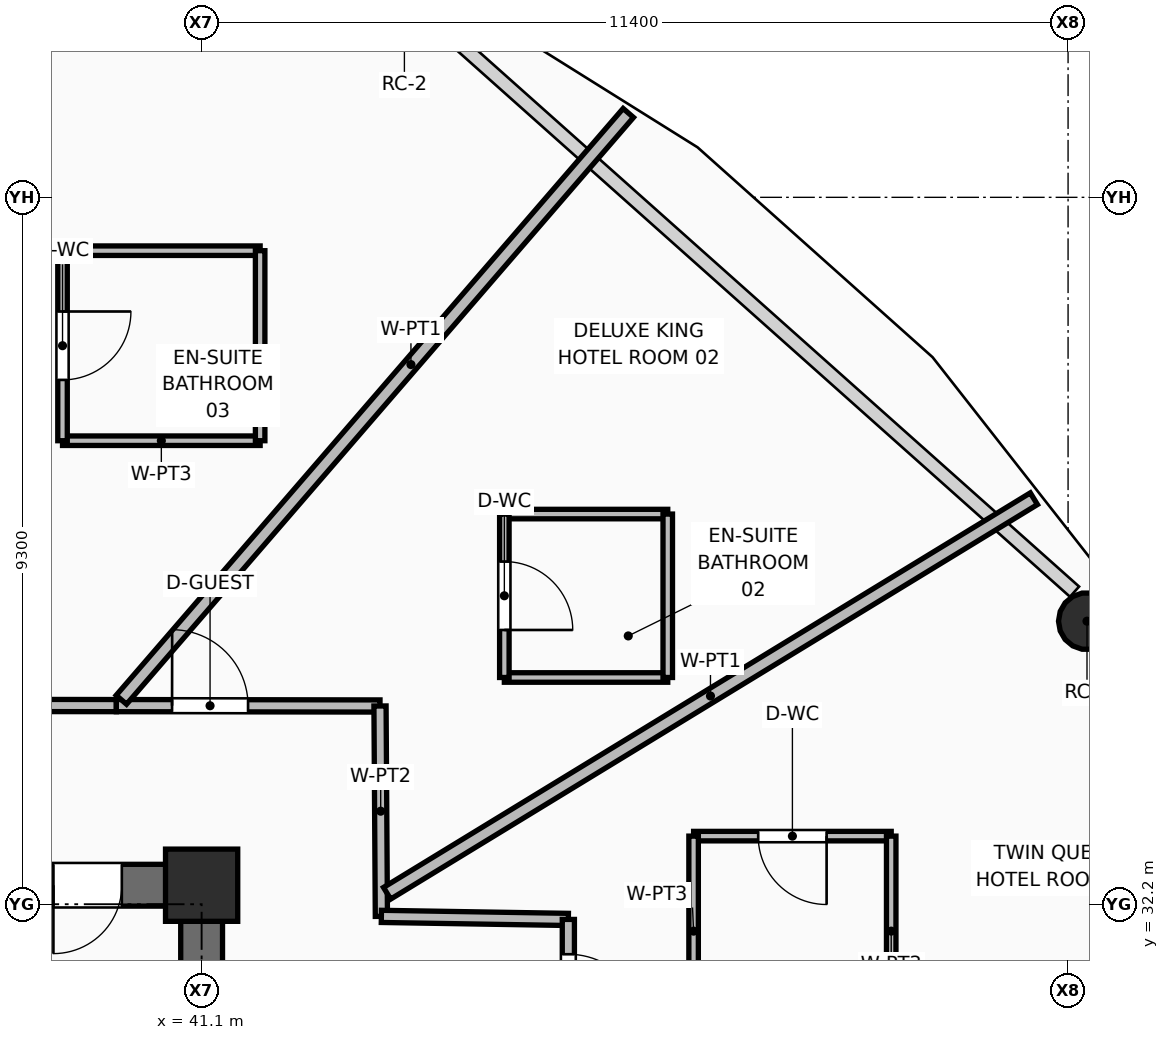
"""IFC4 building model, lengths in metres.
Left out: names, types, materials, properties, quantities, classifications, styles, units other than length and angle.
Written with IfcOpenShell. Run it as: python <this file> out.ifc"""

import sys

from ifc_helpers import new_model, si_unit, direction, frame, frame_2d, origin, origin_2d, place, context, subcontext, project, spatial, rectangle, hollow_circle, extrude, element, fill, save


model = new_model("IFC4")
c1 = context("Model", 3, precision=1e-05, world=origin(), true_north=direction((0.0, 1.0)))
c2 = subcontext(c1, "Body", "Model", "MODEL_VIEW")
j1 = project(units=[si_unit("LENGTHUNIT", "METRE"), si_unit("PLANEANGLEUNIT", "RADIAN")], contexts=[c1])
p1 = place(None, origin())
s1 = spatial("IfcSite", under=j1, at=p1, CompositionType="ELEMENT")
p2 = place(p1, origin())
s2 = spatial("IfcBuilding", under=s1, at=p2, CompositionType="ELEMENT")
p3 = place(p2, frame((0.0, 0.0, 164.7)))
s3 = spatial("IfcBuildingStorey", under=s2, at=p3, CompositionType="ELEMENT", Elevation=164.7)
p4 = place(p3, frame((41.1, 32.45, 0.0), z_axis=(0.0, 0.0, 1.0), x_axis=(1.0, 0.0, 0.0)))
e1 = element("IfcColumn", 1, at=p4, inside=s3, PredefinedType="COLUMN", context=c2, shape_type="SweptSolid", body=[
    extrude(rectangle(XDim=0.95, YDim=0.95, at=origin_2d()), origin(), (0.0, 0.0, 1.0), 3.75),
])
p5 = place(p3, frame((52.749, 35.924, 0.0), z_axis=(0.0, 0.0, 1.0), x_axis=(1.0, 0.0, 0.0)))
e2 = element("IfcColumn", 2, at=p5, inside=s3, PredefinedType="COLUMN", context=c2, shape_type="SweptSolid", body=[
    extrude(hollow_circle(Radius=0.375, WallThickness=0.035, at=origin_2d()), origin(), (0.0, 0.0, 1.0), 3.57),
])
p6 = place(p3, frame((21.625, 32.45, 0.0), z_axis=(0.0, 0.0, 1.0), x_axis=(1.0, 0.0, 0.0)))
e3 = element("IfcWall", 3, at=p6, inside=s3, PredefinedType="SHEAR", context=c2, shape_type="SweptSolid", body=[
    extrude(rectangle(XDim=19.75, YDim=0.55, at=frame_2d((9.875, 0.0))), origin(), (0.0, 0.0, 1.0), 3.57),
])
p7 = place(p6, frame((2.125, 0.0, 0.0)))
e4 = element("IfcOpeningElement", 4, at=p7, cuts=e3, PredefinedType="OPENING", context=c2, shape_type="SweptSolid", body=[
    extrude(rectangle(XDim=1.1, YDim=2.1, at=frame_2d((0.55, 1.05))), frame((0.0, 0.285, 0.0), z_axis=(0.0, -1.0, 0.0), x_axis=(1.0, 0.0, 0.0)), (0.0, 0.0, 1.0), 0.57),
])
p8 = place(p6, frame((15.515, 0.0, 0.0)))
e5 = element("IfcOpeningElement", 5, at=p8, cuts=e3, PredefinedType="OPENING", context=c2, shape_type="SweptSolid", body=[
    extrude(rectangle(XDim=1.0, YDim=2.1, at=frame_2d((0.5, 1.05))), frame((0.0, 0.285, 0.0), z_axis=(0.0, -1.0, 0.0), x_axis=(1.0, 0.0, 0.0)), (0.0, 0.0, 1.0), 0.57),
])
p9 = place(p6, frame((17.525, 0.0, 0.0)))
e6 = element("IfcOpeningElement", 6, at=p9, cuts=e3, PredefinedType="OPENING", context=c2, shape_type="SweptSolid", body=[
    extrude(rectangle(XDim=0.9, YDim=2.1, at=frame_2d((0.45, 1.05))), frame((0.0, 0.285, 0.0), z_axis=(0.0, -1.0, 0.0), x_axis=(1.0, 0.0, 0.0)), (0.0, 0.0, 1.0), 0.57),
])
p10 = place(p3, frame((41.1, 18.075, 0.0), z_axis=(0.0, 0.0, 1.0), x_axis=(0.0, 1.0, 0.0)))
e7 = element("IfcWall", 7, at=p10, inside=s3, PredefinedType="SHEAR", context=c2, shape_type="SweptSolid", body=[
    extrude(rectangle(XDim=14.1, YDim=0.55, at=frame_2d((7.05, 0.0))), origin(), (0.0, 0.0, 1.0), 3.57),
])
p11 = place(p10, frame((3.385, 0.0, 0.0)))
e8 = element("IfcOpeningElement", 8, at=p11, cuts=e7, PredefinedType="OPENING", context=c2, shape_type="SweptSolid", body=[
    extrude(rectangle(XDim=1.05, YDim=2.1, at=frame_2d((0.525, 1.05))), frame((0.0, 0.285, 0.0), z_axis=(0.0, -1.0, 0.0), x_axis=(1.0, 0.0, 0.0)), (0.0, 0.0, 1.0), 0.57),
])
p12 = place(p3, frame((38.54, 34.815, 0.0), z_axis=(0.0, 0.0, 1.0), x_axis=(0.999999077601, -0.001358233043, 0.0)))
e9 = element("IfcWall", 9, at=p12, inside=s3, PredefinedType="PARTITIONING", context=c2, shape_type="SweptSolid", body=[
    extrude(rectangle(XDim=1.438, YDim=0.16, at=frame_2d((0.719, 0.0))), origin(), (0.0, 0.0, 1.0), 3.55),
])
p13 = place(p3, frame((39.978, 34.813, 0.0), z_axis=(0.0, 0.0, 1.0), x_axis=(0.999999009391, -0.001407557195, 0.0)))
e10 = element("IfcWall", 10, at=p13, inside=s3, PredefinedType="PARTITIONING", context=c2, shape_type="SweptSolid", body=[
    extrude(rectangle(XDim=3.469, YDim=0.16, at=frame_2d((1.734, 0.0))), origin(), (0.0, 0.0, 1.0), 3.006),
])
p14 = place(p13, frame((0.733, 0.0, 0.0)))
e11 = element("IfcOpeningElement", 11, at=p14, cuts=e10, PredefinedType="OPENING", context=c2, shape_type="SweptSolid", body=[
    extrude(rectangle(XDim=1.0, YDim=2.1, at=frame_2d((0.5, 1.05))), frame((0.0, 0.09, 0.0), z_axis=(0.0, -1.0, 0.0), x_axis=(1.0, 0.0, 0.0)), (0.0, 0.0, 1.0), 0.18),
])
p15 = place(p3, frame((43.447, 34.808, 0.0), z_axis=(0.0, 0.0, 1.0), x_axis=(0.006526585281, -0.999978701615, 0.0)))
e12 = element("IfcWall", 12, at=p15, inside=s3, PredefinedType="PARTITIONING", context=c2, shape_type="SweptSolid", body=[
    extrude(rectangle(XDim=2.768, YDim=0.16, at=frame_2d((1.384, 0.0))), origin(), (0.0, 0.0, 1.0), 3.006),
])
p16 = place(p3, frame((43.465, 32.04, 0.0), z_axis=(0.0, 0.0, 1.0), x_axis=(0.999867567339, -0.016274144605, 0.0)))
e13 = element("IfcWall", 13, at=p16, inside=s3, PredefinedType="PARTITIONING", context=c2, shape_type="SweptSolid", body=[
    extrude(rectangle(XDim=2.46, YDim=0.16, at=frame_2d((1.23, 0.0))), origin(), (0.0, 0.0, 1.0), 3.55),
])
p17 = place(p3, frame((45.925, 32.0, 0.0), z_axis=(0.0, 0.0, 1.0), x_axis=(0.0, -1.0, 0.0)))
e14 = element("IfcWall", 14, at=p17, inside=s3, PredefinedType="PARTITIONING", context=c2, shape_type="SweptSolid", body=[
    extrude(rectangle(XDim=3.259, YDim=0.16, at=frame_2d((1.629, 0.0))), origin(), (0.0, 0.0, 1.0), 3.55),
])
p18 = place(p17, frame((0.458, 0.0, 0.0)))
e15 = element("IfcOpeningElement", 15, at=p18, cuts=e14, PredefinedType="OPENING", context=c2, shape_type="SweptSolid", body=[
    extrude(rectangle(XDim=1.0, YDim=2.1, at=frame_2d((0.5, 1.05))), frame((0.0, 0.09, 0.0), z_axis=(0.0, -1.0, 0.0), x_axis=(1.0, 0.0, 0.0)), (0.0, 0.0, 1.0), 0.18),
])
p19 = place(p3, frame((43.54, 32.344, 0.0), z_axis=(0.0, 0.0, 1.0), x_axis=(0.853711993856, 0.520745457537, 0.0)))
e16 = element("IfcWall", 16, at=p19, inside=s3, PredefinedType="PARTITIONING", context=c2, shape_type="SweptSolid", body=[
    extrude(rectangle(XDim=9.968, YDim=0.18, at=frame_2d((4.984, 0.0))), origin(), (0.0, 0.0, 1.0), 2.852),
])
p20 = place(p3, frame((40.044, 34.89, 0.0), z_axis=(0.0, 0.0, 1.0), x_axis=(0.653771871809, 0.756691707125, 0.0)))
e17 = element("IfcWall", 17, at=p20, inside=s3, PredefinedType="PARTITIONING", context=c2, shape_type="SweptSolid", body=[
    extrude(rectangle(XDim=10.203, YDim=0.18, at=frame_2d((5.101, 0.0))), origin(), (0.0, 0.0, 1.0), 2.852),
])
p21 = place(p3, frame((47.573, 33.096, 0.0), z_axis=(0.0, 0.0, 1.0), x_axis=(1.0, 0.0, 0.0)))
e18 = element("IfcWall", 18, at=p21, inside=s3, PredefinedType="PARTITIONING", context=c2, shape_type="SweptSolid", body=[
    extrude(rectangle(XDim=2.6, YDim=0.125, at=frame_2d((1.3, 0.0))), origin(), (0.0, 0.0, 1.0), 3.55),
])
p22 = place(p21, frame((0.85, 0.0, 0.0)))
e19 = element("IfcOpeningElement", 19, at=p22, cuts=e18, PredefinedType="OPENING", context=c2, shape_type="SweptSolid", body=[
    extrude(rectangle(XDim=0.9, YDim=2.1, at=frame_2d((0.45, 1.05))), frame((0.0, 0.073, 0.0), z_axis=(0.0, -1.0, 0.0), x_axis=(1.0, 0.0, 0.0)), (0.0, 0.0, 1.0), 0.145),
])
for number, where, z_axis, x_axis in (
    (20, (47.573, 30.596, 0.0), (0.0, 0.0, 1.0), (0.0, 1.0, 0.0)),
    (21, (50.173, 30.596, 0.0), (0.0, 0.0, 1.0), (0.0, 1.0, 0.0)),
):
    element("IfcWall", number, at=place(p3, frame(where, z_axis=z_axis, x_axis=x_axis)), inside=s3, PredefinedType="PARTITIONING", context=c2, shape_type="SweptSolid", body=[
        extrude(rectangle(XDim=2.5, YDim=0.125, at=frame_2d((1.25, 0.0))), origin(), (0.0, 0.0, 1.0), 3.55),
    ])
for number, where, z_axis, x_axis in (
    (22, (45.083, 35.183, 0.0), (0.0, 0.0, 1.0), (1.0, 0.0, 0.0)),
    (23, (45.083, 37.333, 0.0), (0.0, 0.0, 1.0), (1.0, 0.0, 0.0)),
):
    element("IfcWall", number, at=place(p3, frame(where, z_axis=z_axis, x_axis=x_axis)), inside=s3, PredefinedType="PARTITIONING", context=c2, shape_type="SweptSolid", body=[
        extrude(rectangle(XDim=2.15, YDim=0.125, at=frame_2d((1.075, 0.0))), origin(), (0.0, 0.0, 1.0), 3.55),
    ])
p23 = place(p3, frame((45.083, 35.183, 0.0), z_axis=(0.0, 0.0, 1.0), x_axis=(0.0, 1.0, 0.0)))
e24 = element("IfcWall", 24, at=p23, inside=s3, PredefinedType="PARTITIONING", context=c2, shape_type="SweptSolid", body=[
    extrude(rectangle(XDim=2.15, YDim=0.125, at=frame_2d((1.075, 0.0))), origin(), (0.0, 0.0, 1.0), 3.55),
])
p24 = place(p23, frame((0.625, 0.0, 0.0)))
e25 = element("IfcOpeningElement", 25, at=p24, cuts=e24, PredefinedType="OPENING", context=c2, shape_type="SweptSolid", body=[
    extrude(rectangle(XDim=0.9, YDim=2.1, at=frame_2d((0.45, 1.05))), frame((0.0, 0.073, 0.0), z_axis=(0.0, -1.0, 0.0), x_axis=(1.0, 0.0, 0.0)), (0.0, 0.0, 1.0), 0.145),
])
p25 = place(p3, frame((47.233, 35.183, 0.0), z_axis=(0.0, 0.0, 1.0), x_axis=(0.0, 1.0, 0.0)))
e26 = element("IfcWall", 26, at=p25, inside=s3, PredefinedType="PARTITIONING", context=c2, shape_type="SweptSolid", body=[
    extrude(rectangle(XDim=2.15, YDim=0.125, at=frame_2d((1.075, 0.0))), origin(), (0.0, 0.0, 1.0), 3.55),
])
for number, where, z_axis, x_axis in (
    (27, (39.27, 38.298, 0.0), (0.0, 0.0, 1.0), (1.0, 0.0, 0.0)),
    (28, (39.27, 40.798, 0.0), (0.0, 0.0, 1.0), (1.0, 0.0, 0.0)),
):
    element("IfcWall", number, at=place(p3, frame(where, z_axis=z_axis, x_axis=x_axis)), inside=s3, PredefinedType="PARTITIONING", context=c2, shape_type="SweptSolid", body=[
        extrude(rectangle(XDim=2.6, YDim=0.125, at=frame_2d((1.3, 0.0))), origin(), (0.0, 0.0, 1.0), 3.55),
    ])
p26 = place(p3, frame((39.27, 38.298, 0.0), z_axis=(0.0, 0.0, 1.0), x_axis=(0.0, 1.0, 0.0)))
e29 = element("IfcWall", 29, at=p26, inside=s3, PredefinedType="PARTITIONING", context=c2, shape_type="SweptSolid", body=[
    extrude(rectangle(XDim=2.5, YDim=0.125, at=frame_2d((1.25, 0.0))), origin(), (0.0, 0.0, 1.0), 3.55),
])
p27 = place(p26, frame((0.8, 0.0, 0.0)))
e30 = element("IfcOpeningElement", 30, at=p27, cuts=e29, PredefinedType="OPENING", context=c2, shape_type="SweptSolid", body=[
    extrude(rectangle(XDim=0.9, YDim=2.1, at=frame_2d((0.45, 1.05))), frame((0.0, 0.073, 0.0), z_axis=(0.0, -1.0, 0.0), x_axis=(1.0, 0.0, 0.0)), (0.0, 0.0, 1.0), 0.145),
])
p28 = place(p3, frame((41.87, 38.298, 0.0), z_axis=(0.0, 0.0, 1.0), x_axis=(0.0, 1.0, 0.0)))
e31 = element("IfcWall", 31, at=p28, inside=s3, PredefinedType="PARTITIONING", context=c2, shape_type="SweptSolid", body=[
    extrude(rectangle(XDim=2.5, YDim=0.125, at=frame_2d((1.25, 0.0))), origin(), (0.0, 0.0, 1.0), 3.55),
])
p29 = place(p9, frame((0.9, 0.0, 0.0), z_axis=(0.0, 0.0, 1.0), x_axis=(-1.0, 0.0, 0.0)))
e32 = element("IfcDoor", 32, at=p29, inside=s3, OperationType="SINGLE_SWING_RIGHT", PredefinedType="DOOR", context=c2, shape_type="SweptSolid", body=[
    extrude(rectangle(XDim=0.9, YDim=2.1, at=frame_2d((0.45, 1.05))), frame((0.0, 0.025, 0.0), z_axis=(0.0, -1.0, 0.0), x_axis=(1.0, 0.0, 0.0)), (0.0, 0.0, 1.0), 0.05),
])
fill(e6, e32)
p30 = place(p22, frame((0.9, 0.0, 0.0), z_axis=(0.0, 0.0, 1.0), x_axis=(-1.0, 0.0, 0.0)))
e33 = element("IfcDoor", 33, at=p30, inside=s3, OperationType="SINGLE_SWING_LEFT", PredefinedType="DOOR", context=c2, shape_type="SweptSolid", body=[
    extrude(rectangle(XDim=0.9, YDim=2.1, at=frame_2d((0.45, 1.05))), frame((0.0, 0.025, 0.0), z_axis=(0.0, -1.0, 0.0), x_axis=(1.0, 0.0, 0.0)), (0.0, 0.0, 1.0), 0.05),
])
fill(e19, e33)
p31 = place(p18, origin())
e34 = element("IfcDoor", 34, at=p31, inside=s3, OperationType="SINGLE_SWING_RIGHT", PredefinedType="DOOR", context=c2, shape_type="SweptSolid", body=[
    extrude(rectangle(XDim=1.0, YDim=2.1, at=frame_2d((0.5, 1.05))), frame((0.0, 0.025, 0.0), z_axis=(0.0, -1.0, 0.0), x_axis=(1.0, 0.0, 0.0)), (0.0, 0.0, 1.0), 0.05),
])
fill(e15, e34)
p32 = place(p24, frame((0.9, 0.0, 0.0), z_axis=(0.0, 0.0, 1.0), x_axis=(-1.0, 0.0, 0.0)))
e35 = element("IfcDoor", 35, at=p32, inside=s3, OperationType="SINGLE_SWING_RIGHT", PredefinedType="DOOR", context=c2, shape_type="SweptSolid", body=[
    extrude(rectangle(XDim=0.9, YDim=2.1, at=frame_2d((0.45, 1.05))), frame((0.0, 0.025, 0.0), z_axis=(0.0, -1.0, 0.0), x_axis=(1.0, 0.0, 0.0)), (0.0, 0.0, 1.0), 0.05),
])
fill(e25, e35)
p33 = place(p14, origin())
e36 = element("IfcDoor", 36, at=p33, inside=s3, OperationType="SINGLE_SWING_LEFT", PredefinedType="DOOR", context=c2, shape_type="SweptSolid", body=[
    extrude(rectangle(XDim=1.0, YDim=2.1, at=frame_2d((0.5, 1.05))), frame((0.0, 0.025, 0.0), z_axis=(0.0, -1.0, 0.0), x_axis=(1.0, 0.0, 0.0)), (0.0, 0.0, 1.0), 0.05),
])
fill(e11, e36)
p34 = place(p27, frame((0.9, 0.0, 0.0), z_axis=(0.0, 0.0, 1.0), x_axis=(-1.0, 0.0, 0.0)))
e37 = element("IfcDoor", 37, at=p34, inside=s3, OperationType="SINGLE_SWING_LEFT", PredefinedType="DOOR", context=c2, shape_type="SweptSolid", body=[
    extrude(rectangle(XDim=0.9, YDim=2.1, at=frame_2d((0.45, 1.05))), frame((0.0, 0.025, 0.0), z_axis=(0.0, -1.0, 0.0), x_axis=(1.0, 0.0, 0.0)), (0.0, 0.0, 1.0), 0.05),
])
fill(e30, e37)
save(model, sys.argv[1])
